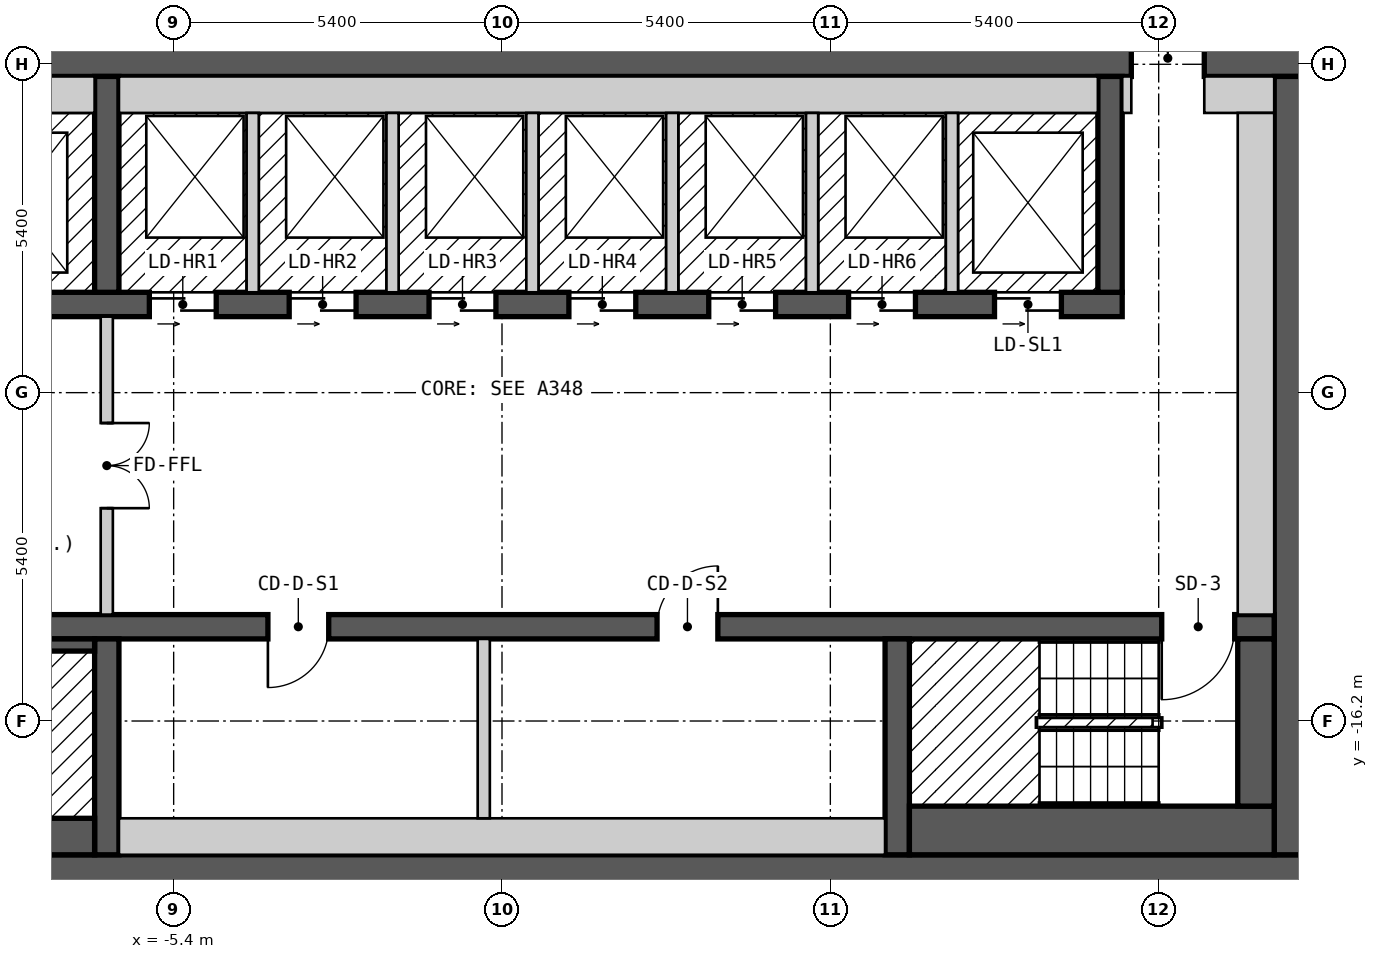
"""IFC4 building model, lengths in metres.
Left out: names, types, materials, properties, quantities, classifications, styles, units other than length and angle.
Written with IfcOpenShell. Run it as: python <this file> out.ifc"""

import sys

from ifc_helpers import new_model, si_unit, direction, frame, frame_2d, origin, place, context, subcontext, project, spatial, rectangle, extrude, element, fill, save


model = new_model("IFC4")
c1 = context("Model", 3, precision=1e-05, world=origin(), true_north=direction((0.0, 1.0)))
c2 = subcontext(c1, "Body", "Model", "MODEL_VIEW")
j1 = project(units=[si_unit("LENGTHUNIT", "METRE"), si_unit("PLANEANGLEUNIT", "RADIAN")], contexts=[c1])
p1 = place(None, origin())
s1 = spatial("IfcSite", under=j1, at=p1, CompositionType="ELEMENT")
p2 = place(p1, origin())
s2 = spatial("IfcBuilding", under=s1, at=p2, CompositionType="ELEMENT")
p3 = place(p2, frame((0.0, 0.0, 178.2)))
s3 = spatial("IfcBuildingStorey", under=s2, at=p3, CompositionType="ELEMENT", Elevation=178.2)
p4 = place(p3, frame((-13.3, -18.7, 0.0), z_axis=(0.0, 0.0, 1.0), x_axis=(1.0, 0.0, 0.0)))
e1 = element("IfcWall", 1, at=p4, inside=s3, PredefinedType="SHEAR", context=c2, shape_type="SweptSolid", body=[
    extrude(rectangle(XDim=26.6, YDim=0.6, at=frame_2d((13.3, 0.0))), origin(), (0.0, 0.0, 1.0), 2.7),
])
p5 = place(p3, frame((-13.3, -5.3, 0.0), z_axis=(0.0, 0.0, 1.0), x_axis=(1.0, 0.0, 0.0)))
e2 = element("IfcWall", 2, at=p5, inside=s3, PredefinedType="SHEAR", context=c2, shape_type="SweptSolid", body=[
    extrude(rectangle(XDim=26.6, YDim=0.6, at=frame_2d((13.3, 0.0))), origin(), (0.0, 0.0, 1.0), 2.7),
])
p6 = place(p5, frame((23.65, 0.0, 0.0)))
e3 = element("IfcOpeningElement", 3, at=p6, cuts=e2, PredefinedType="OPENING", context=c2, shape_type="SweptSolid", body=[
    extrude(rectangle(XDim=1.2, YDim=2.1, at=frame_2d((0.6, 1.05))), frame((0.0, 0.31, 0.0), z_axis=(0.0, -1.0, 0.0), x_axis=(1.0, 0.0, 0.0)), (0.0, 0.0, 1.0), 0.62),
])
p7 = place(p3, frame((13.0, -18.4, 0.0), z_axis=(0.0, 0.0, 1.0), x_axis=(0.0, 1.0, 0.0)))
e4 = element("IfcWall", 4, at=p7, inside=s3, PredefinedType="SHEAR", context=c2, shape_type="SweptSolid", body=[
    extrude(rectangle(XDim=12.8, YDim=0.6, at=frame_2d((6.4, 0.0))), origin(), (0.0, 0.0, 1.0), 2.7),
])
p8 = place(p3, frame((-12.7, -14.65, 0.0), z_axis=(0.0, 0.0, 1.0), x_axis=(1.0, 0.0, 0.0)))
e5 = element("IfcWall", 5, at=p8, inside=s3, PredefinedType="SHEAR", context=c2, shape_type="SweptSolid", body=[
    extrude(rectangle(XDim=25.4, YDim=0.4, at=frame_2d((12.7, 0.0))), origin(), (0.0, 0.0, 1.0), 2.7),
])
p9 = place(p8, frame((1.9, 0.0, 0.0), z_axis=(0.0, 0.0, 1.0), x_axis=(-1.0, 0.0, 0.0)))
e6 = element("IfcOpeningElement", 6, at=p9, cuts=e5, PredefinedType="OPENING", context=c2, shape_type="SweptSolid", body=[
    extrude(rectangle(XDim=1.2, YDim=2.1, at=frame_2d((0.6, 1.05))), frame((0.0, 0.21, 0.0), z_axis=(0.0, -1.0, 0.0), x_axis=(1.0, 0.0, 0.0)), (0.0, 0.0, 1.0), 0.42),
])
p10 = place(p8, frame((24.75, 0.0, 0.0), z_axis=(0.0, 0.0, 1.0), x_axis=(-1.0, 0.0, 0.0)))
e7 = element("IfcOpeningElement", 7, at=p10, cuts=e5, PredefinedType="OPENING", context=c2, shape_type="SweptSolid", body=[
    extrude(rectangle(XDim=1.2, YDim=2.1, at=frame_2d((0.6, 1.05))), frame((0.0, 0.21, 0.0), z_axis=(0.0, -1.0, 0.0), x_axis=(1.0, 0.0, 0.0)), (0.0, 0.0, 1.0), 0.42),
])
p11 = place(p8, frame((9.85, 0.0, 0.0), z_axis=(0.0, 0.0, 1.0), x_axis=(-1.0, 0.0, 0.0)))
e8 = element("IfcOpeningElement", 8, at=p11, cuts=e5, PredefinedType="OPENING", context=c2, shape_type="SweptSolid", body=[
    extrude(rectangle(XDim=1.0, YDim=2.1, at=frame_2d((0.5, 1.05))), frame((0.0, 0.21, 0.0), z_axis=(0.0, -1.0, 0.0), x_axis=(1.0, 0.0, 0.0)), (0.0, 0.0, 1.0), 0.42),
])
p12 = place(p8, frame((16.25, 0.0, 0.0), z_axis=(0.0, 0.0, 1.0), x_axis=(-1.0, 0.0, 0.0)))
e9 = element("IfcOpeningElement", 9, at=p12, cuts=e5, PredefinedType="OPENING", context=c2, shape_type="SweptSolid", body=[
    extrude(rectangle(XDim=1.0, YDim=2.1, at=frame_2d((0.5, 1.05))), frame((0.0, 0.21, 0.0), z_axis=(0.0, -1.0, 0.0), x_axis=(1.0, 0.0, 0.0)), (0.0, 0.0, 1.0), 0.42),
])
p13 = place(p3, frame((-12.7, -9.35, 0.0), z_axis=(0.0, 0.0, 1.0), x_axis=(1.0, 0.0, 0.0)))
e10 = element("IfcWall", 10, at=p13, inside=s3, PredefinedType="SHEAR", context=c2, shape_type="SweptSolid", body=[
    extrude(rectangle(XDim=22.9, YDim=0.4, at=frame_2d((11.45, 0.0))), origin(), (0.0, 0.0, 1.0), 2.7),
])
p14 = place(p13, frame((1.3, 0.0, 0.0)))
e11 = element("IfcOpeningElement", 11, at=p14, cuts=e10, PredefinedType="OPENING", context=c2, shape_type="SweptSolid", body=[
    extrude(rectangle(XDim=1.1, YDim=2.1, at=frame_2d((0.55, 1.05))), frame((0.0, 0.21, 0.0), z_axis=(0.0, -1.0, 0.0), x_axis=(1.0, 0.0, 0.0)), (0.0, 0.0, 1.0), 0.42),
])
p15 = place(p13, frame((4.1, 0.0, 0.0)))
e12 = element("IfcOpeningElement", 12, at=p15, cuts=e10, PredefinedType="OPENING", context=c2, shape_type="SweptSolid", body=[
    extrude(rectangle(XDim=1.1, YDim=2.1, at=frame_2d((0.55, 1.05))), frame((0.0, 0.21, 0.0), z_axis=(0.0, -1.0, 0.0), x_axis=(1.0, 0.0, 0.0)), (0.0, 0.0, 1.0), 0.42),
])
p16 = place(p13, frame((6.9, 0.0, 0.0)))
e13 = element("IfcOpeningElement", 13, at=p16, cuts=e10, PredefinedType="OPENING", context=c2, shape_type="SweptSolid", body=[
    extrude(rectangle(XDim=1.1, YDim=2.1, at=frame_2d((0.55, 1.05))), frame((0.0, 0.21, 0.0), z_axis=(0.0, -1.0, 0.0), x_axis=(1.0, 0.0, 0.0)), (0.0, 0.0, 1.0), 0.42),
])
p17 = place(p13, frame((9.2, 0.0, 0.0)))
e14 = element("IfcOpeningElement", 14, at=p17, cuts=e10, PredefinedType="OPENING", context=c2, shape_type="SweptSolid", body=[
    extrude(rectangle(XDim=1.1, YDim=2.1, at=frame_2d((0.55, 1.05))), frame((0.0, 0.21, 0.0), z_axis=(0.0, -1.0, 0.0), x_axis=(1.0, 0.0, 0.0)), (0.0, 0.0, 1.0), 0.42),
])
p18 = place(p13, frame((11.5, 0.0, 0.0)))
e15 = element("IfcOpeningElement", 15, at=p18, cuts=e10, PredefinedType="OPENING", context=c2, shape_type="SweptSolid", body=[
    extrude(rectangle(XDim=1.1, YDim=2.1, at=frame_2d((0.55, 1.05))), frame((0.0, 0.21, 0.0), z_axis=(0.0, -1.0, 0.0), x_axis=(1.0, 0.0, 0.0)), (0.0, 0.0, 1.0), 0.42),
])
p19 = place(p13, frame((13.8, 0.0, 0.0)))
e16 = element("IfcOpeningElement", 16, at=p19, cuts=e10, PredefinedType="OPENING", context=c2, shape_type="SweptSolid", body=[
    extrude(rectangle(XDim=1.1, YDim=2.1, at=frame_2d((0.55, 1.05))), frame((0.0, 0.21, 0.0), z_axis=(0.0, -1.0, 0.0), x_axis=(1.0, 0.0, 0.0)), (0.0, 0.0, 1.0), 0.42),
])
p20 = place(p13, frame((16.1, 0.0, 0.0)))
e17 = element("IfcOpeningElement", 17, at=p20, cuts=e10, PredefinedType="OPENING", context=c2, shape_type="SweptSolid", body=[
    extrude(rectangle(XDim=1.1, YDim=2.1, at=frame_2d((0.55, 1.05))), frame((0.0, 0.21, 0.0), z_axis=(0.0, -1.0, 0.0), x_axis=(1.0, 0.0, 0.0)), (0.0, 0.0, 1.0), 0.42),
])
p21 = place(p13, frame((18.4, 0.0, 0.0)))
e18 = element("IfcOpeningElement", 18, at=p21, cuts=e10, PredefinedType="OPENING", context=c2, shape_type="SweptSolid", body=[
    extrude(rectangle(XDim=1.1, YDim=2.1, at=frame_2d((0.55, 1.05))), frame((0.0, 0.21, 0.0), z_axis=(0.0, -1.0, 0.0), x_axis=(1.0, 0.0, 0.0)), (0.0, 0.0, 1.0), 0.42),
])
p22 = place(p13, frame((20.8, 0.0, 0.0)))
e19 = element("IfcOpeningElement", 19, at=p22, cuts=e10, PredefinedType="OPENING", context=c2, shape_type="SweptSolid", body=[
    extrude(rectangle(XDim=1.1, YDim=2.1, at=frame_2d((0.55, 1.05))), frame((0.0, 0.21, 0.0), z_axis=(0.0, -1.0, 0.0), x_axis=(1.0, 0.0, 0.0)), (0.0, 0.0, 1.0), 0.42),
])
for number, where, z_axis, x_axis in (
    (20, (-6.5, -18.4, 0.0), (0.0, 0.0, 1.0), (0.0, 1.0, 0.0)),
    (21, (6.5, -18.4, 0.0), (0.0, 0.0, 1.0), (0.0, 1.0, 0.0)),
    (22, (-6.5, -9.15, 0.0), (0.0, 0.0, 1.0), (0.0, 1.0, 0.0)),
    (23, (10.0, -9.15, 0.0), (0.0, 0.0, 1.0), (0.0, 1.0, 0.0)),
):
    element("IfcWall", number, at=place(p3, frame(where, z_axis=z_axis, x_axis=x_axis)), inside=s3, PredefinedType="SHEAR", context=c2, shape_type="SweptSolid", body=[
        extrude(rectangle(XDim=3.55, YDim=0.4, at=frame_2d((1.775, 0.0))), origin(), (0.0, 0.0, 1.0), 2.7),
    ])
for number, where, z_axis, x_axis in (
    (24, (-12.1, -18.1, 0.0), (0.0, 0.0, 1.0), (1.0, 0.0, 0.0)),
    (25, (-12.1, -5.9, 0.0), (0.0, 0.0, 1.0), (1.0, 0.0, 0.0)),
):
    element("IfcWall", number, at=place(p3, frame(where, z_axis=z_axis, x_axis=x_axis)), inside=s3, PredefinedType="SOLIDWALL", context=c2, shape_type="SweptSolid", body=[
        extrude(rectangle(XDim=5.4, YDim=0.6, at=frame_2d((2.7, 0.0))), origin(), (0.0, 0.0, 1.0), 2.7),
    ])
p23 = place(p3, frame((-10.8, -14.95, 0.0), z_axis=(0.0, 0.0, 1.0), x_axis=(1.0, 0.0, 0.0)))
e26 = element("IfcWall", 26, at=p23, inside=s3, PredefinedType="SOLIDWALL", context=c2, shape_type="SweptSolid", body=[
    extrude(rectangle(XDim=4.1, YDim=0.2, at=frame_2d((2.05, 0.0))), origin(), (0.0, 0.0, 1.0), 2.7),
])
p24 = place(p3, frame((-6.5, -14.45, 0.0), z_axis=(0.0, 0.0, 1.0), x_axis=(0.0, 1.0, 0.0)))
e27 = element("IfcWall", 27, at=p24, inside=s3, PredefinedType="PARTITIONING", context=c2, shape_type="SweptSolid", body=[
    extrude(rectangle(XDim=4.9, YDim=0.2, at=frame_2d((2.45, 0.0))), origin(), (0.0, 0.0, 1.0), 2.7),
])
p25 = place(p24, frame((3.15, 0.0, 0.0), z_axis=(0.0, 0.0, 1.0), x_axis=(-1.0, 0.0, 0.0)))
e28 = element("IfcOpeningElement", 28, at=p25, cuts=e27, PredefinedType="OPENING", context=c2, shape_type="SweptSolid", body=[
    extrude(rectangle(XDim=1.4, YDim=2.1, at=frame_2d((0.7, 1.05))), frame((0.0, 0.11, 0.0), z_axis=(0.0, -1.0, 0.0), x_axis=(1.0, 0.0, 0.0)), (0.0, 0.0, 1.0), 0.22),
])
p26 = place(p3, frame((-6.3, -18.1, 0.0), z_axis=(0.0, 0.0, 1.0), x_axis=(1.0, 0.0, 0.0)))
e29 = element("IfcWall", 29, at=p26, inside=s3, PredefinedType="PARTITIONING", context=c2, shape_type="SweptSolid", body=[
    extrude(rectangle(XDim=12.6, YDim=0.6, at=frame_2d((6.3, 0.0))), origin(), (0.0, 0.0, 1.0), 2.7),
])
p27 = place(p3, frame((-6.3, -5.9, 0.0), z_axis=(0.0, 0.0, 1.0), x_axis=(1.0, 0.0, 0.0)))
e30 = element("IfcWall", 30, at=p27, inside=s3, PredefinedType="SOLIDWALL", context=c2, shape_type="SweptSolid", body=[
    extrude(rectangle(XDim=16.1, YDim=0.6, at=frame_2d((8.05, 0.0))), origin(), (0.0, 0.0, 1.0), 2.7),
])
for number, where, z_axis, x_axis in (
    (31, (-4.1, -9.15, 0.0), (0.0, 0.0, 1.0), (0.0, 1.0, 0.0)),
    (32, (-1.8, -9.15, 0.0), (0.0, 0.0, 1.0), (0.0, 1.0, 0.0)),
):
    element("IfcWall", number, at=place(p3, frame(where, z_axis=z_axis, x_axis=x_axis)), inside=s3, PredefinedType="SOLIDWALL", context=c2, shape_type="SweptSolid", body=[
        extrude(rectangle(XDim=2.95, YDim=0.2, at=frame_2d((1.475, 0.0))), origin(), (0.0, 0.0, 1.0), 2.7),
    ])
p28 = place(p3, frame((-0.3, -17.8, 0.0), z_axis=(0.0, 0.0, 1.0), x_axis=(0.0, 1.0, 0.0)))
e33 = element("IfcWall", 33, at=p28, inside=s3, PredefinedType="PARTITIONING", context=c2, shape_type="SweptSolid", body=[
    extrude(rectangle(XDim=2.95, YDim=0.2, at=frame_2d((1.475, 0.0))), origin(), (0.0, 0.0, 1.0), 2.7),
])
for number, where, z_axis, x_axis in (
    (34, (0.5, -9.15, 0.0), (0.0, 0.0, 1.0), (0.0, 1.0, 0.0)),
    (35, (2.8, -9.15, 0.0), (0.0, 0.0, 1.0), (0.0, 1.0, 0.0)),
    (36, (5.1, -9.15, 0.0), (0.0, 0.0, 1.0), (0.0, 1.0, 0.0)),
):
    element("IfcWall", number, at=place(p3, frame(where, z_axis=z_axis, x_axis=x_axis)), inside=s3, PredefinedType="SOLIDWALL", context=c2, shape_type="SweptSolid", body=[
        extrude(rectangle(XDim=2.95, YDim=0.2, at=frame_2d((1.475, 0.0))), origin(), (0.0, 0.0, 1.0), 2.7),
    ])
p29 = place(p3, frame((6.7, -18.0, 0.0), z_axis=(0.0, 0.0, 1.0), x_axis=(1.0, 0.0, 0.0)))
e37 = element("IfcWall", 37, at=p29, inside=s3, PredefinedType="SOLIDWALL", context=c2, shape_type="SweptSolid", body=[
    extrude(rectangle(XDim=6.0, YDim=0.8, at=frame_2d((3.0, 0.0))), origin(), (0.0, 0.0, 1.0), 2.7),
])
p30 = place(p3, frame((7.4, -9.15, 0.0), z_axis=(0.0, 0.0, 1.0), x_axis=(0.0, 1.0, 0.0)))
e38 = element("IfcWall", 38, at=p30, inside=s3, PredefinedType="SOLIDWALL", context=c2, shape_type="SweptSolid", body=[
    extrude(rectangle(XDim=2.95, YDim=0.2, at=frame_2d((1.475, 0.0))), origin(), (0.0, 0.0, 1.0), 2.7),
])
p31 = place(p3, frame((10.275, -6.2, 0.0), z_axis=(0.0, 0.0, 1.0), x_axis=(0.0, 1.0, 0.0)))
e39 = element("IfcWall", 39, at=p31, inside=s3, PredefinedType="PARTITIONING", context=c2, shape_type="SweptSolid", body=[
    extrude(rectangle(XDim=0.6, YDim=0.15, at=frame_2d((0.3, 0.0))), origin(), (0.0, 0.0, 1.0), 2.7),
])
p32 = place(p3, frame((11.55, -5.9, 0.0), z_axis=(0.0, 0.0, 1.0), x_axis=(1.0, 0.0, 0.0)))
e40 = element("IfcWall", 40, at=p32, inside=s3, PredefinedType="PARTITIONING", context=c2, shape_type="SweptSolid", body=[
    extrude(rectangle(XDim=1.15, YDim=0.6, at=frame_2d((0.575, 0.0))), origin(), (0.0, 0.0, 1.0), 2.7),
])
p33 = place(p3, frame((12.4, -17.6, 0.0), z_axis=(0.0, 0.0, 1.0), x_axis=(0.0, 1.0, 0.0)))
e41 = element("IfcWall", 41, at=p33, inside=s3, PredefinedType="SOLIDWALL", context=c2, shape_type="SweptSolid", body=[
    extrude(rectangle(XDim=2.75, YDim=0.6, at=frame_2d((1.375, 0.0))), origin(), (0.0, 0.0, 1.0), 2.7),
])
p34 = place(p3, frame((12.4, -14.45, 0.0), z_axis=(0.0, 0.0, 1.0), x_axis=(0.0, 1.0, 0.0)))
e42 = element("IfcWall", 42, at=p34, inside=s3, PredefinedType="PARTITIONING", context=c2, shape_type="SweptSolid", body=[
    extrude(rectangle(XDim=8.25, YDim=0.6, at=frame_2d((4.125, 0.0))), origin(), (0.0, 0.0, 1.0), 2.7),
])
p35 = place(p16, origin())
e43 = element("IfcDoor", 43, at=p35, inside=s3, OperationType="DOUBLE_DOOR_SLIDING", PredefinedType="DOOR", context=c2, shape_type="SweptSolid", body=[
    extrude(rectangle(XDim=1.1, YDim=2.1, at=frame_2d((0.55, 1.05))), frame((0.0, 0.025, 0.0), z_axis=(0.0, -1.0, 0.0), x_axis=(1.0, 0.0, 0.0)), (0.0, 0.0, 1.0), 0.05),
])
fill(e13, e43)
p36 = place(p17, origin())
e44 = element("IfcDoor", 44, at=p36, inside=s3, OperationType="DOUBLE_DOOR_SLIDING", PredefinedType="DOOR", context=c2, shape_type="SweptSolid", body=[
    extrude(rectangle(XDim=1.1, YDim=2.1, at=frame_2d((0.55, 1.05))), frame((0.0, 0.025, 0.0), z_axis=(0.0, -1.0, 0.0), x_axis=(1.0, 0.0, 0.0)), (0.0, 0.0, 1.0), 0.05),
])
fill(e14, e44)
p37 = place(p18, origin())
e45 = element("IfcDoor", 45, at=p37, inside=s3, OperationType="DOUBLE_DOOR_SLIDING", PredefinedType="DOOR", context=c2, shape_type="SweptSolid", body=[
    extrude(rectangle(XDim=1.1, YDim=2.1, at=frame_2d((0.55, 1.05))), frame((0.0, 0.025, 0.0), z_axis=(0.0, -1.0, 0.0), x_axis=(1.0, 0.0, 0.0)), (0.0, 0.0, 1.0), 0.05),
])
fill(e15, e45)
p38 = place(p19, origin())
e46 = element("IfcDoor", 46, at=p38, inside=s3, OperationType="DOUBLE_DOOR_SLIDING", PredefinedType="DOOR", context=c2, shape_type="SweptSolid", body=[
    extrude(rectangle(XDim=1.1, YDim=2.1, at=frame_2d((0.55, 1.05))), frame((0.0, 0.025, 0.0), z_axis=(0.0, -1.0, 0.0), x_axis=(1.0, 0.0, 0.0)), (0.0, 0.0, 1.0), 0.05),
])
fill(e16, e46)
p39 = place(p20, origin())
e47 = element("IfcDoor", 47, at=p39, inside=s3, OperationType="DOUBLE_DOOR_SLIDING", PredefinedType="DOOR", context=c2, shape_type="SweptSolid", body=[
    extrude(rectangle(XDim=1.1, YDim=2.1, at=frame_2d((0.55, 1.05))), frame((0.0, 0.025, 0.0), z_axis=(0.0, -1.0, 0.0), x_axis=(1.0, 0.0, 0.0)), (0.0, 0.0, 1.0), 0.05),
])
fill(e17, e47)
p40 = place(p21, origin())
e48 = element("IfcDoor", 48, at=p40, inside=s3, OperationType="DOUBLE_DOOR_SLIDING", PredefinedType="DOOR", context=c2, shape_type="SweptSolid", body=[
    extrude(rectangle(XDim=1.1, YDim=2.1, at=frame_2d((0.55, 1.05))), frame((0.0, 0.025, 0.0), z_axis=(0.0, -1.0, 0.0), x_axis=(1.0, 0.0, 0.0)), (0.0, 0.0, 1.0), 0.05),
])
fill(e18, e48)
p41 = place(p22, origin())
e49 = element("IfcDoor", 49, at=p41, inside=s3, OperationType="DOUBLE_DOOR_SLIDING", PredefinedType="DOOR", context=c2, shape_type="SweptSolid", body=[
    extrude(rectangle(XDim=1.1, YDim=2.1, at=frame_2d((0.55, 1.05))), frame((0.0, 0.025, 0.0), z_axis=(0.0, -1.0, 0.0), x_axis=(1.0, 0.0, 0.0)), (0.0, 0.0, 1.0), 0.05),
])
fill(e19, e49)
p42 = place(p10, origin())
e50 = element("IfcDoor", 50, at=p42, inside=s3, OperationType="SINGLE_SWING_RIGHT", PredefinedType="DOOR", context=c2, shape_type="SweptSolid", body=[
    extrude(rectangle(XDim=1.2, YDim=2.1, at=frame_2d((0.6, 1.05))), frame((0.0, 0.025, 0.0), z_axis=(0.0, -1.0, 0.0), x_axis=(1.0, 0.0, 0.0)), (0.0, 0.0, 1.0), 0.05),
])
fill(e7, e50)
p43 = place(p25, origin())
e51 = element("IfcDoor", 51, at=p43, inside=s3, OperationType="DOUBLE_DOOR_SINGLE_SWING", PredefinedType="DOOR", context=c2, shape_type="SweptSolid", body=[
    extrude(rectangle(XDim=1.4, YDim=2.1, at=frame_2d((0.7, 1.05))), frame((0.0, 0.025, 0.0), z_axis=(0.0, -1.0, 0.0), x_axis=(1.0, 0.0, 0.0)), (0.0, 0.0, 1.0), 0.05),
])
fill(e28, e51)
p44 = place(p6, origin())
e52 = element("IfcDoor", 52, at=p44, inside=s3, OperationType="DOUBLE_DOOR_SINGLE_SWING", PredefinedType="DOOR", context=c2, shape_type="SweptSolid", body=[
    extrude(rectangle(XDim=1.2, YDim=2.1, at=frame_2d((0.6, 1.05))), frame((0.0, 0.025, 0.0), z_axis=(0.0, -1.0, 0.0), x_axis=(1.0, 0.0, 0.0)), (0.0, 0.0, 1.0), 0.05),
])
fill(e3, e52)
p45 = place(p11, origin())
e53 = element("IfcDoor", 53, at=p45, inside=s3, OperationType="SINGLE_SWING_RIGHT", PredefinedType="DOOR", context=c2, shape_type="SweptSolid", body=[
    extrude(rectangle(XDim=1.0, YDim=2.1, at=frame_2d((0.5, 1.05))), frame((0.0, 0.025, 0.0), z_axis=(0.0, -1.0, 0.0), x_axis=(1.0, 0.0, 0.0)), (0.0, 0.0, 1.0), 0.05),
])
fill(e8, e53)
p46 = place(p12, origin())
e54 = element("IfcDoor", 54, at=p46, inside=s3, OperationType="SINGLE_SWING_LEFT", PredefinedType="DOOR", context=c2, shape_type="SweptSolid", body=[
    extrude(rectangle(XDim=1.0, YDim=2.1, at=frame_2d((0.5, 1.05))), frame((0.0, 0.025, 0.0), z_axis=(0.0, -1.0, 0.0), x_axis=(1.0, 0.0, 0.0)), (0.0, 0.0, 1.0), 0.05),
])
fill(e9, e54)
save(model, sys.argv[1])
